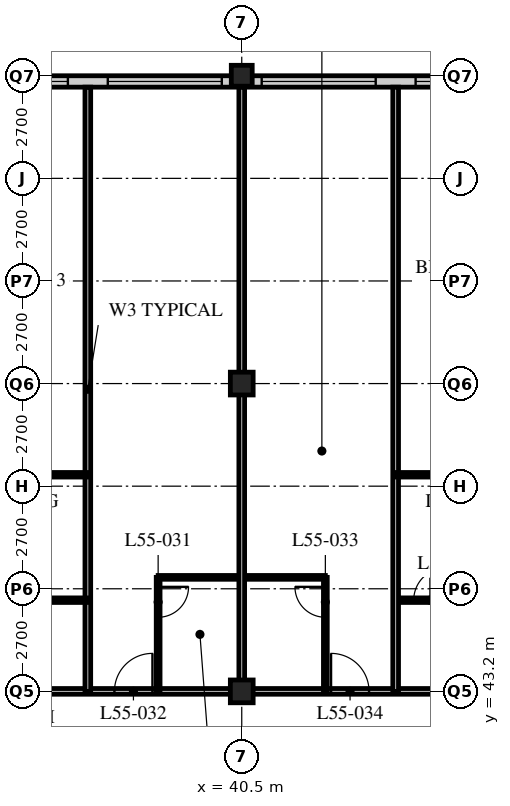
"""IFC4 building model, lengths in metres.
Left out: names, types, materials, properties, quantities, classifications, styles, units other than length and angle.
Written with IfcOpenShell. Run it as: python <this file> out.ifc"""

import sys

from ifc_helpers import new_model, si_unit, direction, frame, frame_2d, origin, origin_2d, place, context, subcontext, project, spatial, rectangle, hollow_rectangle, extrude, element, fill, save


model = new_model("IFC4")
c1 = context("Model", 3, precision=1e-05, world=origin(), true_north=direction((0.0, 1.0)))
c2 = subcontext(c1, "Body", "Model", "MODEL_VIEW")
j1 = project(units=[si_unit("LENGTHUNIT", "METRE"), si_unit("PLANEANGLEUNIT", "RADIAN")], contexts=[c1])
p1 = place(None, origin())
s1 = spatial("IfcSite", under=j1, at=p1, CompositionType="ELEMENT")
p2 = place(p1, origin())
s2 = spatial("IfcBuilding", under=s1, at=p2, CompositionType="ELEMENT")
p3 = place(p2, frame((0.0, 0.0, 213.6)))
s3 = spatial("IfcBuildingStorey", under=s2, at=p3, CompositionType="ELEMENT", Elevation=213.6)
for number, where, z_axis, x_axis in (
    (1, (40.5, 43.2, 0.0), (0.0, 0.0, 1.0), (1.0, 0.0, 0.0)),
    (2, (40.5, 51.3, 0.0), (0.0, 0.0, 1.0), (1.0, 0.0, 0.0)),
):
    element("IfcColumn", number, at=place(p3, frame(where, z_axis=z_axis, x_axis=x_axis)), inside=s3, PredefinedType="COLUMN", context=c2, shape_type="SweptSolid", body=[
        extrude(hollow_rectangle(XDim=0.6, YDim=0.6, WallThickness=0.05, at=origin_2d()), origin(), (0.0, 0.0, 1.0), 3.6),
    ])
p4 = place(p3, frame((40.5, 59.4, 0.0), z_axis=(0.0, 0.0, 1.0), x_axis=(1.0, 0.0, 0.0)))
e3 = element("IfcColumn", 3, at=p4, inside=s3, PredefinedType="COLUMN", context=c2, shape_type="SweptSolid", body=[
    extrude(hollow_rectangle(XDim=0.55, YDim=0.55, WallThickness=0.045, at=origin_2d()), origin(), (0.0, 0.0, 1.0), 3.6),
])
p5 = place(p3, frame((48.3, 59.25, 0.0), z_axis=(0.0, 0.0, 1.0), x_axis=(-1.0, 0.0, 0.0)))
e4 = element("IfcWall", 4, at=p5, inside=s3, PredefinedType="SOLIDWALL", context=c2, shape_type="SweptSolid", body=[
    extrude(rectangle(XDim=40.2, YDim=0.3, at=frame_2d((20.1, 0.0))), origin(), (0.0, 0.0, 1.0), 3.39),
])
p6 = place(p5, frame((0.225, 0.0, 0.6)))
e5 = element("IfcOpeningElement", 5, at=p6, cuts=e4, PredefinedType="OPENING", context=c2, shape_type="SweptSolid", body=[
    extrude(rectangle(XDim=3.0, YDim=2.4, at=frame_2d((1.5, 1.2))), frame((0.0, 0.16, 0.0), z_axis=(0.0, -1.0, 0.0), x_axis=(1.0, 0.0, 0.0)), (0.0, 0.0, 1.0), 0.32),
])
p7 = place(p5, frame((4.275, 0.0, 0.6)))
e6 = element("IfcOpeningElement", 6, at=p7, cuts=e4, PredefinedType="OPENING", context=c2, shape_type="SweptSolid", body=[
    extrude(rectangle(XDim=3.0, YDim=2.4, at=frame_2d((1.5, 1.2))), frame((0.0, 0.16, 0.0), z_axis=(0.0, -1.0, 0.0), x_axis=(1.0, 0.0, 0.0)), (0.0, 0.0, 1.0), 0.32),
])
p8 = place(p5, frame((8.325, 0.0, 0.6)))
e7 = element("IfcOpeningElement", 7, at=p8, cuts=e4, PredefinedType="OPENING", context=c2, shape_type="SweptSolid", body=[
    extrude(rectangle(XDim=3.0, YDim=2.4, at=frame_2d((1.5, 1.2))), frame((0.0, 0.16, 0.0), z_axis=(0.0, -1.0, 0.0), x_axis=(1.0, 0.0, 0.0)), (0.0, 0.0, 1.0), 0.32),
])
p9 = place(p5, frame((12.375, 0.0, 0.6)))
e8 = element("IfcOpeningElement", 8, at=p9, cuts=e4, PredefinedType="OPENING", context=c2, shape_type="SweptSolid", body=[
    extrude(rectangle(XDim=3.0, YDim=2.4, at=frame_2d((1.5, 1.2))), frame((0.0, 0.16, 0.0), z_axis=(0.0, -1.0, 0.0), x_axis=(1.0, 0.0, 0.0)), (0.0, 0.0, 1.0), 0.32),
])
p10 = place(p5, frame((16.425, 0.0, 0.6)))
e9 = element("IfcOpeningElement", 9, at=p10, cuts=e4, PredefinedType="OPENING", context=c2, shape_type="SweptSolid", body=[
    extrude(rectangle(XDim=3.0, YDim=2.4, at=frame_2d((1.5, 1.2))), frame((0.0, 0.16, 0.0), z_axis=(0.0, -1.0, 0.0), x_axis=(1.0, 0.0, 0.0)), (0.0, 0.0, 1.0), 0.32),
])
p11 = place(p5, frame((20.475, 0.0, 0.6)))
e10 = element("IfcOpeningElement", 10, at=p11, cuts=e4, PredefinedType="OPENING", context=c2, shape_type="SweptSolid", body=[
    extrude(rectangle(XDim=3.0, YDim=2.4, at=frame_2d((1.5, 1.2))), frame((0.0, 0.16, 0.0), z_axis=(0.0, -1.0, 0.0), x_axis=(1.0, 0.0, 0.0)), (0.0, 0.0, 1.0), 0.32),
])
p12 = place(p5, frame((24.525, 0.0, 0.6)))
e11 = element("IfcOpeningElement", 11, at=p12, cuts=e4, PredefinedType="OPENING", context=c2, shape_type="SweptSolid", body=[
    extrude(rectangle(XDim=3.0, YDim=2.4, at=frame_2d((1.5, 1.2))), frame((0.0, 0.16, 0.0), z_axis=(0.0, -1.0, 0.0), x_axis=(1.0, 0.0, 0.0)), (0.0, 0.0, 1.0), 0.32),
])
p13 = place(p5, frame((28.575, 0.0, 0.6)))
e12 = element("IfcOpeningElement", 12, at=p13, cuts=e4, PredefinedType="OPENING", context=c2, shape_type="SweptSolid", body=[
    extrude(rectangle(XDim=3.0, YDim=2.4, at=frame_2d((1.5, 1.2))), frame((0.0, 0.16, 0.0), z_axis=(0.0, -1.0, 0.0), x_axis=(1.0, 0.0, 0.0)), (0.0, 0.0, 1.0), 0.32),
])
p14 = place(p5, frame((32.625, 0.0, 0.6)))
e13 = element("IfcOpeningElement", 13, at=p14, cuts=e4, PredefinedType="OPENING", context=c2, shape_type="SweptSolid", body=[
    extrude(rectangle(XDim=3.0, YDim=2.4, at=frame_2d((1.5, 1.2))), frame((0.0, 0.16, 0.0), z_axis=(0.0, -1.0, 0.0), x_axis=(1.0, 0.0, 0.0)), (0.0, 0.0, 1.0), 0.32),
])
p15 = place(p5, frame((36.675, 0.0, 0.6)))
e14 = element("IfcOpeningElement", 14, at=p15, cuts=e4, PredefinedType="OPENING", context=c2, shape_type="SweptSolid", body=[
    extrude(rectangle(XDim=3.0, YDim=2.4, at=frame_2d((1.5, 1.2))), frame((0.0, 0.16, 0.0), z_axis=(0.0, -1.0, 0.0), x_axis=(1.0, 0.0, 0.0)), (0.0, 0.0, 1.0), 0.32),
])
p16 = place(p3, frame((12.15, 43.2, 0.0), z_axis=(0.0, 0.0, 1.0), x_axis=(1.0, 0.0, 0.0)))
e15 = element("IfcWall", 15, at=p16, inside=s3, PredefinedType="PARTITIONING", context=c2, shape_type="SweptSolid", body=[
    extrude(rectangle(XDim=36.45, YDim=0.15, at=frame_2d((18.225, 0.0))), origin(), (0.0, 0.0, 1.0), 2.778),
])
p17 = place(p16, frame((4.95, 0.0, 0.0)))
e16 = element("IfcOpeningElement", 16, at=p17, cuts=e15, PredefinedType="OPENING", context=c2, shape_type="SweptSolid", body=[
    extrude(rectangle(XDim=1.0, YDim=2.1, at=frame_2d((0.5, 1.05))), frame((0.0, 0.085, 0.0), z_axis=(0.0, -1.0, 0.0), x_axis=(1.0, 0.0, 0.0)), (0.0, 0.0, 1.0), 0.17),
])
p18 = place(p16, frame((25.0, 0.0, 0.0)))
e17 = element("IfcOpeningElement", 17, at=p18, cuts=e15, PredefinedType="OPENING", context=c2, shape_type="SweptSolid", body=[
    extrude(rectangle(XDim=1.0, YDim=2.1, at=frame_2d((0.5, 1.05))), frame((0.0, 0.085, 0.0), z_axis=(0.0, -1.0, 0.0), x_axis=(1.0, 0.0, 0.0)), (0.0, 0.0, 1.0), 0.17),
])
p19 = place(p16, frame((30.7, 0.0, 0.0)))
e18 = element("IfcOpeningElement", 18, at=p19, cuts=e15, PredefinedType="OPENING", context=c2, shape_type="SweptSolid", body=[
    extrude(rectangle(XDim=1.0, YDim=2.1, at=frame_2d((0.5, 1.05))), frame((0.0, 0.085, 0.0), z_axis=(0.0, -1.0, 0.0), x_axis=(1.0, 0.0, 0.0)), (0.0, 0.0, 1.0), 0.17),
])
p20 = place(p16, frame((33.925, 0.0, 0.0)))
e19 = element("IfcOpeningElement", 19, at=p20, cuts=e15, PredefinedType="OPENING", context=c2, shape_type="SweptSolid", body=[
    extrude(rectangle(XDim=1.0, YDim=2.1, at=frame_2d((0.5, 1.05))), frame((0.0, 0.085, 0.0), z_axis=(0.0, -1.0, 0.0), x_axis=(1.0, 0.0, 0.0)), (0.0, 0.0, 1.0), 0.17),
])
p21 = place(p16, frame((1.525, 0.0, 0.0)))
e20 = element("IfcOpeningElement", 20, at=p21, cuts=e15, PredefinedType="OPENING", context=c2, shape_type="SweptSolid", body=[
    extrude(rectangle(XDim=1.0, YDim=2.1, at=frame_2d((0.5, 1.05))), frame((0.0, 0.085, 0.0), z_axis=(0.0, -1.0, 0.0), x_axis=(1.0, 0.0, 0.0)), (0.0, 0.0, 1.0), 0.17),
])
p22 = place(p3, frame((36.45, 43.2, 0.0), z_axis=(0.0, 0.0, 1.0), x_axis=(0.0, 1.0, 0.0)))
e21 = element("IfcWall", 21, at=p22, inside=s3, PredefinedType="PARTITIONING", context=c2, shape_type="SweptSolid", body=[
    extrude(rectangle(XDim=15.9, YDim=0.15, at=frame_2d((7.95, 0.0))), origin(), (0.0, 0.0, 1.0), 3.39),
])
p23 = place(p3, frame((38.3, 46.2, 0.0), z_axis=(0.0, 0.0, 1.0), x_axis=(1.0, 0.0, 0.0)))
e22 = element("IfcWall", 22, at=p23, inside=s3, PredefinedType="PARTITIONING", context=c2, shape_type="SweptSolid", body=[
    extrude(rectangle(XDim=4.4, YDim=0.1, at=frame_2d((2.2, 0.0))), origin(), (0.0, 0.0, 1.0), 3.39),
])
p24 = place(p3, frame((38.3, 43.2, 0.0), z_axis=(0.0, 0.0, 1.0), x_axis=(0.0, 1.0, 0.0)))
e23 = element("IfcWall", 23, at=p24, inside=s3, PredefinedType="PARTITIONING", context=c2, shape_type="SweptSolid", body=[
    extrude(rectangle(XDim=3.0, YDim=0.1, at=frame_2d((1.5, 0.0))), origin(), (0.0, 0.0, 1.0), 3.39),
])
p25 = place(p24, frame((1.95, 0.0, 0.0)))
e24 = element("IfcOpeningElement", 24, at=p25, cuts=e23, PredefinedType="OPENING", context=c2, shape_type="SweptSolid", body=[
    extrude(rectangle(XDim=0.8, YDim=2.1, at=frame_2d((0.4, 1.05))), frame((0.0, 0.06, 0.0), z_axis=(0.0, -1.0, 0.0), x_axis=(1.0, 0.0, 0.0)), (0.0, 0.0, 1.0), 0.12),
])
p26 = place(p3, frame((40.5, 43.2, 0.0), z_axis=(0.0, 0.0, 1.0), x_axis=(0.0, 1.0, 0.0)))
e25 = element("IfcWall", 25, at=p26, inside=s3, PredefinedType="PARTITIONING", context=c2, shape_type="SweptSolid", body=[
    extrude(rectangle(XDim=15.9, YDim=0.15, at=frame_2d((7.95, 0.0))), origin(), (0.0, 0.0, 1.0), 2.778),
])
p27 = place(p3, frame((42.7, 43.2, 0.0), z_axis=(0.0, 0.0, 1.0), x_axis=(0.0, 1.0, 0.0)))
e26 = element("IfcWall", 26, at=p27, inside=s3, PredefinedType="PARTITIONING", context=c2, shape_type="SweptSolid", body=[
    extrude(rectangle(XDim=3.0, YDim=0.1, at=frame_2d((1.5, 0.0))), origin(), (0.0, 0.0, 1.0), 3.39),
])
p28 = place(p27, frame((1.95, 0.0, 0.0)))
e27 = element("IfcOpeningElement", 27, at=p28, cuts=e26, PredefinedType="OPENING", context=c2, shape_type="SweptSolid", body=[
    extrude(rectangle(XDim=0.8, YDim=2.1, at=frame_2d((0.4, 1.05))), frame((0.0, 0.06, 0.0), z_axis=(0.0, -1.0, 0.0), x_axis=(1.0, 0.0, 0.0)), (0.0, 0.0, 1.0), 0.12),
])
p29 = place(p3, frame((44.55, 45.6, 0.0), z_axis=(0.0, 0.0, 1.0), x_axis=(1.0, 0.0, 0.0)))
e28 = element("IfcWall", 28, at=p29, inside=s3, PredefinedType="PARTITIONING", context=c2, shape_type="SweptSolid", body=[
    extrude(rectangle(XDim=8.05, YDim=0.12, at=frame_2d((4.025, 0.0))), origin(), (0.0, 0.0, 1.0), 3.39),
])
p30 = place(p29, frame((0.475, 0.0, 0.0)))
e29 = element("IfcOpeningElement", 29, at=p30, cuts=e28, PredefinedType="OPENING", context=c2, shape_type="SweptSolid", body=[
    extrude(rectangle(XDim=0.85, YDim=2.1, at=frame_2d((0.425, 1.05))), frame((0.0, 0.07, 0.0), z_axis=(0.0, -1.0, 0.0), x_axis=(1.0, 0.0, 0.0)), (0.0, 0.0, 1.0), 0.14),
])
p31 = place(p29, frame((4.325, 0.0, 0.0)))
e30 = element("IfcOpeningElement", 30, at=p31, cuts=e28, PredefinedType="OPENING", context=c2, shape_type="SweptSolid", body=[
    extrude(rectangle(XDim=0.85, YDim=2.1, at=frame_2d((0.425, 1.05))), frame((0.0, 0.07, 0.0), z_axis=(0.0, -1.0, 0.0), x_axis=(1.0, 0.0, 0.0)), (0.0, 0.0, 1.0), 0.14),
])
p32 = place(p3, frame((44.55, 43.2, 0.0), z_axis=(0.0, 0.0, 1.0), x_axis=(0.0, 1.0, 0.0)))
e31 = element("IfcWall", 31, at=p32, inside=s3, PredefinedType="PARTITIONING", context=c2, shape_type="SweptSolid", body=[
    extrude(rectangle(XDim=15.9, YDim=0.15, at=frame_2d((7.95, 0.0))), origin(), (0.0, 0.0, 1.0), 3.39),
])
p33 = place(p3, frame((8.15, 45.6, 0.0), z_axis=(0.0, 0.0, 1.0), x_axis=(1.0, 0.0, 0.0)))
e32 = element("IfcWall", 32, at=p33, inside=s3, PredefinedType="PARTITIONING", context=c2, shape_type="SweptSolid", body=[
    extrude(rectangle(XDim=28.3, YDim=0.12, at=frame_2d((14.15, 0.0))), origin(), (0.0, 0.0, 1.0), 3.39),
])
p34 = place(p33, frame((9.025, 0.0, 0.0)))
e33 = element("IfcOpeningElement", 33, at=p34, cuts=e32, PredefinedType="OPENING", context=c2, shape_type="SweptSolid", body=[
    extrude(rectangle(XDim=0.85, YDim=2.1, at=frame_2d((0.425, 1.05))), frame((0.0, 0.07, 0.0), z_axis=(0.0, -1.0, 0.0), x_axis=(1.0, 0.0, 0.0)), (0.0, 0.0, 1.0), 0.14),
])
p35 = place(p33, frame((16.475, 0.0, 0.0)))
e34 = element("IfcOpeningElement", 34, at=p35, cuts=e32, PredefinedType="OPENING", context=c2, shape_type="SweptSolid", body=[
    extrude(rectangle(XDim=0.85, YDim=2.1, at=frame_2d((0.425, 1.05))), frame((0.0, 0.07, 0.0), z_axis=(0.0, -1.0, 0.0), x_axis=(1.0, 0.0, 0.0)), (0.0, 0.0, 1.0), 0.14),
])
p36 = place(p33, frame((20.525, 0.0, 0.0)))
e35 = element("IfcOpeningElement", 35, at=p36, cuts=e32, PredefinedType="OPENING", context=c2, shape_type="SweptSolid", body=[
    extrude(rectangle(XDim=0.85, YDim=2.1, at=frame_2d((0.425, 1.05))), frame((0.0, 0.07, 0.0), z_axis=(0.0, -1.0, 0.0), x_axis=(1.0, 0.0, 0.0)), (0.0, 0.0, 1.0), 0.14),
])
p37 = place(p33, frame((24.575, 0.0, 0.0)))
e36 = element("IfcOpeningElement", 36, at=p37, cuts=e32, PredefinedType="OPENING", context=c2, shape_type="SweptSolid", body=[
    extrude(rectangle(XDim=0.85, YDim=2.1, at=frame_2d((0.425, 1.05))), frame((0.0, 0.07, 0.0), z_axis=(0.0, -1.0, 0.0), x_axis=(1.0, 0.0, 0.0)), (0.0, 0.0, 1.0), 0.14),
])
p38 = place(p33, frame((6.725, 0.0, 0.0)))
e37 = element("IfcOpeningElement", 37, at=p38, cuts=e32, PredefinedType="OPENING", context=c2, shape_type="SweptSolid", body=[
    extrude(rectangle(XDim=0.85, YDim=2.1, at=frame_2d((0.425, 1.05))), frame((0.0, 0.07, 0.0), z_axis=(0.0, -1.0, 0.0), x_axis=(1.0, 0.0, 0.0)), (0.0, 0.0, 1.0), 0.14),
])
p39 = place(p33, frame((2.875, 0.0, 0.0)))
e38 = element("IfcOpeningElement", 38, at=p39, cuts=e32, PredefinedType="OPENING", context=c2, shape_type="SweptSolid", body=[
    extrude(rectangle(XDim=0.85, YDim=2.1, at=frame_2d((0.425, 1.05))), frame((0.0, 0.07, 0.0), z_axis=(0.0, -1.0, 0.0), x_axis=(1.0, 0.0, 0.0)), (0.0, 0.0, 1.0), 0.14),
])
p40 = place(p3, frame((28.35, 48.9, 0.0), z_axis=(0.0, 0.0, 1.0), x_axis=(1.0, 0.0, 0.0)))
e39 = element("IfcWall", 39, at=p40, inside=s3, PredefinedType="PARTITIONING", context=c2, shape_type="SweptSolid", body=[
    extrude(rectangle(XDim=8.1, YDim=0.12, at=frame_2d((4.05, 0.0))), origin(), (0.0, 0.0, 1.0), 3.39),
])
p41 = place(p40, frame((1.6, 0.0, 0.0)))
e40 = element("IfcOpeningElement", 40, at=p41, cuts=e39, PredefinedType="OPENING", context=c2, shape_type="SweptSolid", body=[
    extrude(rectangle(XDim=0.85, YDim=2.1, at=frame_2d((0.425, 1.05))), frame((0.0, 0.07, 0.0), z_axis=(0.0, -1.0, 0.0), x_axis=(1.0, 0.0, 0.0)), (0.0, 0.0, 1.0), 0.14),
])
p42 = place(p40, frame((5.65, 0.0, 0.0)))
e41 = element("IfcOpeningElement", 41, at=p42, cuts=e39, PredefinedType="OPENING", context=c2, shape_type="SweptSolid", body=[
    extrude(rectangle(XDim=0.85, YDim=2.1, at=frame_2d((0.425, 1.05))), frame((0.0, 0.07, 0.0), z_axis=(0.0, -1.0, 0.0), x_axis=(1.0, 0.0, 0.0)), (0.0, 0.0, 1.0), 0.14),
])
p43 = place(p3, frame((44.55, 48.9, 0.0), z_axis=(0.0, 0.0, 1.0), x_axis=(1.0, 0.0, 0.0)))
e42 = element("IfcWall", 42, at=p43, inside=s3, PredefinedType="PARTITIONING", context=c2, shape_type="SweptSolid", body=[
    extrude(rectangle(XDim=4.05, YDim=0.12, at=frame_2d((2.025, 0.0))), origin(), (0.0, 0.0, 1.0), 3.39),
])
p44 = place(p43, frame((1.6, 0.0, 0.0)))
e43 = element("IfcOpeningElement", 43, at=p44, cuts=e42, PredefinedType="OPENING", context=c2, shape_type="SweptSolid", body=[
    extrude(rectangle(XDim=0.85, YDim=2.1, at=frame_2d((0.425, 1.05))), frame((0.0, 0.07, 0.0), z_axis=(0.0, -1.0, 0.0), x_axis=(1.0, 0.0, 0.0)), (0.0, 0.0, 1.0), 0.14),
])
p45 = place(p6, origin())
e44 = element("IfcWindow", 44, at=p45, inside=s3, PartitioningType="SINGLE_PANEL", PredefinedType="WINDOW", context=c2, shape_type="SweptSolid", body=[
    extrude(rectangle(XDim=3.0, YDim=2.4, at=frame_2d((1.5, 1.2))), frame((0.0, 0.03, 0.0), z_axis=(0.0, -1.0, 0.0), x_axis=(1.0, 0.0, 0.0)), (0.0, 0.0, 1.0), 0.06),
])
fill(e5, e44)
p46 = place(p7, origin())
e45 = element("IfcWindow", 45, at=p46, inside=s3, PartitioningType="SINGLE_PANEL", PredefinedType="WINDOW", context=c2, shape_type="SweptSolid", body=[
    extrude(rectangle(XDim=3.0, YDim=2.4, at=frame_2d((1.5, 1.2))), frame((0.0, 0.03, 0.0), z_axis=(0.0, -1.0, 0.0), x_axis=(1.0, 0.0, 0.0)), (0.0, 0.0, 1.0), 0.06),
])
fill(e6, e45)
p47 = place(p8, origin())
e46 = element("IfcWindow", 46, at=p47, inside=s3, PartitioningType="SINGLE_PANEL", PredefinedType="WINDOW", context=c2, shape_type="SweptSolid", body=[
    extrude(rectangle(XDim=3.0, YDim=2.4, at=frame_2d((1.5, 1.2))), frame((0.0, 0.03, 0.0), z_axis=(0.0, -1.0, 0.0), x_axis=(1.0, 0.0, 0.0)), (0.0, 0.0, 1.0), 0.06),
])
fill(e7, e46)
p48 = place(p9, origin())
e47 = element("IfcWindow", 47, at=p48, inside=s3, PartitioningType="SINGLE_PANEL", PredefinedType="WINDOW", context=c2, shape_type="SweptSolid", body=[
    extrude(rectangle(XDim=3.0, YDim=2.4, at=frame_2d((1.5, 1.2))), frame((0.0, 0.03, 0.0), z_axis=(0.0, -1.0, 0.0), x_axis=(1.0, 0.0, 0.0)), (0.0, 0.0, 1.0), 0.06),
])
fill(e8, e47)
p49 = place(p25, origin())
e48 = element("IfcDoor", 48, at=p49, inside=s3, OperationType="SINGLE_SWING_LEFT", PredefinedType="DOOR", context=c2, shape_type="SweptSolid", body=[
    extrude(rectangle(XDim=0.8, YDim=2.1, at=frame_2d((0.4, 1.05))), frame((0.0, 0.025, 0.0), z_axis=(0.0, -1.0, 0.0), x_axis=(1.0, 0.0, 0.0)), (0.0, 0.0, 1.0), 0.05),
])
fill(e24, e48)
p50 = place(p18, origin())
e49 = element("IfcDoor", 49, at=p50, inside=s3, OperationType="SINGLE_SWING_RIGHT", PredefinedType="DOOR", context=c2, shape_type="SweptSolid", body=[
    extrude(rectangle(XDim=1.0, YDim=2.1, at=frame_2d((0.5, 1.05))), frame((0.0, 0.025, 0.0), z_axis=(0.0, -1.0, 0.0), x_axis=(1.0, 0.0, 0.0)), (0.0, 0.0, 1.0), 0.05),
])
fill(e17, e49)
p51 = place(p28, origin())
e50 = element("IfcDoor", 50, at=p51, inside=s3, OperationType="SINGLE_SWING_RIGHT", PredefinedType="DOOR", context=c2, shape_type="SweptSolid", body=[
    extrude(rectangle(XDim=0.8, YDim=2.1, at=frame_2d((0.4, 1.05))), frame((0.0, 0.025, 0.0), z_axis=(0.0, -1.0, 0.0), x_axis=(1.0, 0.0, 0.0)), (0.0, 0.0, 1.0), 0.05),
])
fill(e27, e50)
p52 = place(p19, origin())
e51 = element("IfcDoor", 51, at=p52, inside=s3, OperationType="SINGLE_SWING_LEFT", PredefinedType="DOOR", context=c2, shape_type="SweptSolid", body=[
    extrude(rectangle(XDim=1.0, YDim=2.1, at=frame_2d((0.5, 1.05))), frame((0.0, 0.025, 0.0), z_axis=(0.0, -1.0, 0.0), x_axis=(1.0, 0.0, 0.0)), (0.0, 0.0, 1.0), 0.05),
])
fill(e18, e51)
p53 = place(p30, origin())
e52 = element("IfcDoor", 52, at=p53, inside=s3, OperationType="SINGLE_SWING_RIGHT", PredefinedType="DOOR", context=c2, shape_type="SweptSolid", body=[
    extrude(rectangle(XDim=0.85, YDim=2.1, at=frame_2d((0.425, 1.05))), frame((0.0, 0.025, 0.0), z_axis=(0.0, -1.0, 0.0), x_axis=(1.0, 0.0, 0.0)), (0.0, 0.0, 1.0), 0.05),
])
fill(e29, e52)
save(model, sys.argv[1])
